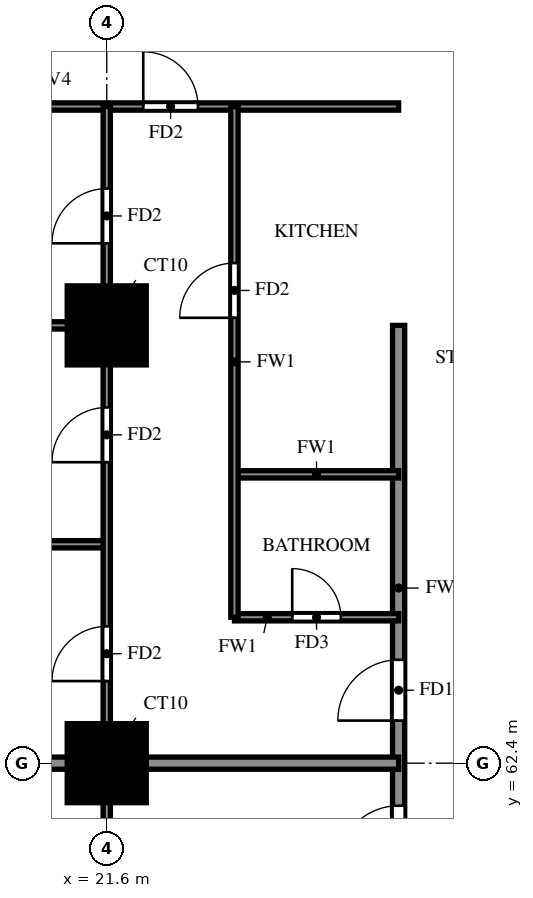
"""IFC4 building model, lengths in metres.
Left out: names, types, materials, properties, quantities, classifications, styles, units other than length and angle.
Written with IfcOpenShell. Run it as: python <this file> out.ifc"""

import sys

from ifc_helpers import new_model, si_unit, direction, frame, frame_2d, origin, origin_2d, place, context, subcontext, project, spatial, rectangle, extrude, source, transform, mapped, element, fill, save


model = new_model("IFC4")
c1 = context("Model", 3, precision=1e-05, world=origin(), true_north=direction((0.0, 1.0)))
c2 = subcontext(c1, "Body", "Model", "MODEL_VIEW")
j1 = project(units=[si_unit("LENGTHUNIT", "METRE"), si_unit("PLANEANGLEUNIT", "RADIAN")], contexts=[c1])
p1 = place(None, origin())
s1 = spatial("IfcSite", under=j1, at=p1, CompositionType="ELEMENT")
p2 = place(p1, origin())
s2 = spatial("IfcBuilding", under=s1, at=p2, CompositionType="ELEMENT")
p3 = place(p2, frame((0.0, 0.0, 62.0)))
s3 = spatial("IfcBuildingStorey", under=s2, at=p3, CompositionType="ELEMENT", Elevation=62.0)
m1 = source(origin(), c2, "Body", "SweptSolid", [
    extrude(rectangle(XDim=1.3, YDim=1.3, at=origin_2d()), origin(), (0.0, 0.0, 1.0), 3.18),
])
for number, where, z_axis, x_axis in (
    (1, (21.6, 62.4, 0.0), (0.0, 0.0, 1.0), (1.0, 0.0, 0.0)),
    (2, (21.6, 69.6, 0.0), (0.0, 0.0, 1.0), (1.0, 0.0, 0.0)),
):
    element("IfcColumn", number, at=place(p3, frame(where, z_axis=z_axis, x_axis=x_axis)), inside=s3, PredefinedType="COLUMN", context=c2, shape_type="MappedRepresentation", body=[
        mapped(m1, transform((0.0, 0.0, 0.0))),
    ])
p4 = place(p3, frame((26.4, 60.0, 0.0), z_axis=(0.0, 0.0, 1.0), x_axis=(0.0, 1.0, 0.0)))
e3 = element("IfcWall", 3, at=p4, inside=s3, PredefinedType="SOLIDWALL", context=c2, shape_type="SweptSolid", body=[
    extrude(rectangle(XDim=9.6, YDim=0.2, at=frame_2d((4.8, 0.0))), origin(), (0.0, 0.0, 1.0), 3.18),
])
p5 = place(p4, frame((0.7, 0.0, 0.0)))
e4 = element("IfcOpeningElement", 4, at=p5, cuts=e3, PredefinedType="OPENING", context=c2, shape_type="SweptSolid", body=[
    extrude(rectangle(XDim=1.0, YDim=2.1, at=frame_2d((0.5, 1.05))), frame((0.0, 0.11, 0.0), z_axis=(0.0, -1.0, 0.0), x_axis=(1.0, 0.0, 0.0)), (0.0, 0.0, 1.0), 0.22),
])
p6 = place(p4, frame((3.1, 0.0, 0.0)))
e5 = element("IfcOpeningElement", 5, at=p6, cuts=e3, PredefinedType="OPENING", context=c2, shape_type="SweptSolid", body=[
    extrude(rectangle(XDim=1.0, YDim=2.1, at=frame_2d((0.5, 1.05))), frame((0.0, 0.11, 0.0), z_axis=(0.0, -1.0, 0.0), x_axis=(1.0, 0.0, 0.0)), (0.0, 0.0, 1.0), 0.22),
])
p7 = place(p3, frame((14.525, 62.4, 0.0), z_axis=(0.0, 0.0, 1.0), x_axis=(1.0, 0.0, 0.0)))
e6 = element("IfcWall", 6, at=p7, inside=s3, PredefinedType="SOLIDWALL", context=c2, shape_type="SweptSolid", body=[
    extrude(rectangle(XDim=11.875, YDim=0.2, at=frame_2d((5.938, 0.0))), origin(), (0.0, 0.0, 1.0), 3.18),
])
p8 = place(p3, frame((23.7, 64.8, 0.0), z_axis=(0.0, 0.0, 1.0), x_axis=(1.0, 0.0, 0.0)))
e7 = element("IfcWall", 7, at=p8, inside=s3, PredefinedType="PARTITIONING", context=c2, shape_type="SweptSolid", body=[
    extrude(rectangle(XDim=2.7, YDim=0.12, at=frame_2d((1.35, 0.0))), origin(), (0.0, 0.0, 1.0), 3.18),
])
p9 = place(p8, frame((0.95, 0.0, 0.0)))
e8 = element("IfcOpeningElement", 8, at=p9, cuts=e7, PredefinedType="OPENING", context=c2, shape_type="SweptSolid", body=[
    extrude(rectangle(XDim=0.8, YDim=2.1, at=frame_2d((0.4, 1.05))), frame((0.0, 0.07, 0.0), z_axis=(0.0, -1.0, 0.0), x_axis=(1.0, 0.0, 0.0)), (0.0, 0.0, 1.0), 0.14),
])
p10 = place(p3, frame((14.525, 66.0, 0.0), z_axis=(0.0, 0.0, 1.0), x_axis=(1.0, 0.0, 0.0)))
e9 = element("IfcWall", 9, at=p10, inside=s3, PredefinedType="PARTITIONING", context=c2, shape_type="SweptSolid", body=[
    extrude(rectangle(XDim=7.075, YDim=0.12, at=frame_2d((3.538, 0.0))), origin(), (0.0, 0.0, 1.0), 2.28),
])
p11 = place(p3, frame((23.7, 67.15, 0.0), z_axis=(0.0, 0.0, 1.0), x_axis=(1.0, 0.0, 0.0)))
e10 = element("IfcWall", 10, at=p11, inside=s3, PredefinedType="PARTITIONING", context=c2, shape_type="SweptSolid", body=[
    extrude(rectangle(XDim=2.7, YDim=0.12, at=frame_2d((1.35, 0.0))), origin(), (0.0, 0.0, 1.0), 3.18),
])
p12 = place(p3, frame((14.525, 69.6, 0.0), z_axis=(0.0, 0.0, 1.0), x_axis=(1.0, 0.0, 0.0)))
e11 = element("IfcWall", 11, at=p12, inside=s3, PredefinedType="PARTITIONING", context=c2, shape_type="SweptSolid", body=[
    extrude(rectangle(XDim=7.075, YDim=0.12, at=frame_2d((3.538, 0.0))), origin(), (0.0, 0.0, 1.0), 3.18),
])
p13 = place(p3, frame((14.525, 73.2, 0.0), z_axis=(0.0, 0.0, 1.0), x_axis=(1.0, 0.0, 0.0)))
e12 = element("IfcWall", 12, at=p13, inside=s3, PredefinedType="PARTITIONING", context=c2, shape_type="SweptSolid", body=[
    extrude(rectangle(XDim=11.875, YDim=0.12, at=frame_2d((5.938, 0.0))), origin(), (0.0, 0.0, 1.0), 2.28),
])
p14 = place(p13, frame((7.675, 0.0, 0.0)))
e13 = element("IfcOpeningElement", 13, at=p14, cuts=e12, PredefinedType="OPENING", context=c2, shape_type="SweptSolid", body=[
    extrude(rectangle(XDim=0.9, YDim=2.1, at=frame_2d((0.45, 1.05))), frame((0.0, 0.07, 0.0), z_axis=(0.0, -1.0, 0.0), x_axis=(1.0, 0.0, 0.0)), (0.0, 0.0, 1.0), 0.14),
])
p15 = place(p3, frame((21.6, 33.725, 0.0), z_axis=(0.0, 0.0, 1.0), x_axis=(0.0, 1.0, 0.0)))
e14 = element("IfcWall", 14, at=p15, inside=s3, PredefinedType="PARTITIONING", context=c2, shape_type="SweptSolid", body=[
    extrude(rectangle(XDim=39.475, YDim=0.12, at=frame_2d((19.737, 0.0))), origin(), (0.0, 0.0, 1.0), 3.18),
])
p16 = place(p15, frame((7.775, 0.0, 0.0)))
e15 = element("IfcOpeningElement", 15, at=p16, cuts=e14, PredefinedType="OPENING", context=c2, shape_type="SweptSolid", body=[
    extrude(rectangle(XDim=0.9, YDim=2.1, at=frame_2d((0.45, 1.05))), frame((0.0, 0.07, 0.0), z_axis=(0.0, -1.0, 0.0), x_axis=(1.0, 0.0, 0.0)), (0.0, 0.0, 1.0), 0.14),
])
p17 = place(p15, frame((15.625, 0.0, 0.0)))
e16 = element("IfcOpeningElement", 16, at=p17, cuts=e14, PredefinedType="OPENING", context=c2, shape_type="SweptSolid", body=[
    extrude(rectangle(XDim=0.9, YDim=2.1, at=frame_2d((0.45, 1.05))), frame((0.0, 0.07, 0.0), z_axis=(0.0, -1.0, 0.0), x_axis=(1.0, 0.0, 0.0)), (0.0, 0.0, 1.0), 0.14),
])
p18 = place(p15, frame((19.225, 0.0, 0.0)))
e17 = element("IfcOpeningElement", 17, at=p18, cuts=e14, PredefinedType="OPENING", context=c2, shape_type="SweptSolid", body=[
    extrude(rectangle(XDim=0.9, YDim=2.1, at=frame_2d((0.45, 1.05))), frame((0.0, 0.07, 0.0), z_axis=(0.0, -1.0, 0.0), x_axis=(1.0, 0.0, 0.0)), (0.0, 0.0, 1.0), 0.14),
])
p19 = place(p15, frame((24.325, 0.0, 0.0)))
e18 = element("IfcOpeningElement", 18, at=p19, cuts=e14, PredefinedType="OPENING", context=c2, shape_type="SweptSolid", body=[
    extrude(rectangle(XDim=1.5, YDim=2.1, at=frame_2d((0.75, 1.05))), frame((0.0, 0.07, 0.0), z_axis=(0.0, -1.0, 0.0), x_axis=(1.0, 0.0, 0.0)), (0.0, 0.0, 1.0), 0.14),
])
p20 = place(p15, frame((30.025, 0.0, 0.0)))
e19 = element("IfcOpeningElement", 19, at=p20, cuts=e14, PredefinedType="OPENING", context=c2, shape_type="SweptSolid", body=[
    extrude(rectangle(XDim=0.9, YDim=2.1, at=frame_2d((0.45, 1.05))), frame((0.0, 0.07, 0.0), z_axis=(0.0, -1.0, 0.0), x_axis=(1.0, 0.0, 0.0)), (0.0, 0.0, 1.0), 0.14),
])
p21 = place(p15, frame((33.625, 0.0, 0.0)))
e20 = element("IfcOpeningElement", 20, at=p21, cuts=e14, PredefinedType="OPENING", context=c2, shape_type="SweptSolid", body=[
    extrude(rectangle(XDim=0.9, YDim=2.1, at=frame_2d((0.45, 1.05))), frame((0.0, 0.07, 0.0), z_axis=(0.0, -1.0, 0.0), x_axis=(1.0, 0.0, 0.0)), (0.0, 0.0, 1.0), 0.14),
])
p22 = place(p15, frame((37.225, 0.0, 0.0)))
e21 = element("IfcOpeningElement", 21, at=p22, cuts=e14, PredefinedType="OPENING", context=c2, shape_type="SweptSolid", body=[
    extrude(rectangle(XDim=0.9, YDim=2.1, at=frame_2d((0.45, 1.05))), frame((0.0, 0.07, 0.0), z_axis=(0.0, -1.0, 0.0), x_axis=(1.0, 0.0, 0.0)), (0.0, 0.0, 1.0), 0.14),
])
p23 = place(p3, frame((23.7, 64.8, 0.0), z_axis=(0.0, 0.0, 1.0), x_axis=(0.0, 1.0, 0.0)))
e22 = element("IfcWall", 22, at=p23, inside=s3, PredefinedType="PARTITIONING", context=c2, shape_type="SweptSolid", body=[
    extrude(rectangle(XDim=8.4, YDim=0.12, at=frame_2d((4.2, 0.0))), origin(), (0.0, 0.0, 1.0), 3.18),
])
p24 = place(p23, frame((4.925, 0.0, 0.0)))
e23 = element("IfcOpeningElement", 23, at=p24, cuts=e22, PredefinedType="OPENING", context=c2, shape_type="SweptSolid", body=[
    extrude(rectangle(XDim=0.9, YDim=2.1, at=frame_2d((0.45, 1.05))), frame((0.0, 0.07, 0.0), z_axis=(0.0, -1.0, 0.0), x_axis=(1.0, 0.0, 0.0)), (0.0, 0.0, 1.0), 0.14),
])
p25 = place(p5, origin())
e24 = element("IfcDoor", 24, at=p25, inside=s3, OperationType="SINGLE_SWING_LEFT", PredefinedType="DOOR", context=c2, shape_type="SweptSolid", body=[
    extrude(rectangle(XDim=1.0, YDim=2.1, at=frame_2d((0.5, 1.05))), frame((0.0, 0.025, 0.0), z_axis=(0.0, -1.0, 0.0), x_axis=(1.0, 0.0, 0.0)), (0.0, 0.0, 1.0), 0.05),
])
fill(e4, e24)
p26 = place(p6, origin())
e25 = element("IfcDoor", 25, at=p26, inside=s3, OperationType="SINGLE_SWING_LEFT", PredefinedType="DOOR", context=c2, shape_type="SweptSolid", body=[
    extrude(rectangle(XDim=1.0, YDim=2.1, at=frame_2d((0.5, 1.05))), frame((0.0, 0.025, 0.0), z_axis=(0.0, -1.0, 0.0), x_axis=(1.0, 0.0, 0.0)), (0.0, 0.0, 1.0), 0.05),
])
fill(e5, e25)
p27 = place(p20, origin())
e26 = element("IfcDoor", 26, at=p27, inside=s3, OperationType="SINGLE_SWING_RIGHT", PredefinedType="DOOR", context=c2, shape_type="SweptSolid", body=[
    extrude(rectangle(XDim=0.9, YDim=2.1, at=frame_2d((0.45, 1.05))), frame((0.0, 0.025, 0.0), z_axis=(0.0, -1.0, 0.0), x_axis=(1.0, 0.0, 0.0)), (0.0, 0.0, 1.0), 0.05),
])
fill(e19, e26)
p28 = place(p21, origin())
e27 = element("IfcDoor", 27, at=p28, inside=s3, OperationType="SINGLE_SWING_LEFT", PredefinedType="DOOR", context=c2, shape_type="SweptSolid", body=[
    extrude(rectangle(XDim=0.9, YDim=2.1, at=frame_2d((0.45, 1.05))), frame((0.0, 0.025, 0.0), z_axis=(0.0, -1.0, 0.0), x_axis=(1.0, 0.0, 0.0)), (0.0, 0.0, 1.0), 0.05),
])
fill(e20, e27)
p29 = place(p22, origin())
e28 = element("IfcDoor", 28, at=p29, inside=s3, OperationType="SINGLE_SWING_LEFT", PredefinedType="DOOR", context=c2, shape_type="SweptSolid", body=[
    extrude(rectangle(XDim=0.9, YDim=2.1, at=frame_2d((0.45, 1.05))), frame((0.0, 0.025, 0.0), z_axis=(0.0, -1.0, 0.0), x_axis=(1.0, 0.0, 0.0)), (0.0, 0.0, 1.0), 0.05),
])
fill(e21, e28)
p30 = place(p14, origin())
e29 = element("IfcDoor", 29, at=p30, inside=s3, OperationType="SINGLE_SWING_RIGHT", PredefinedType="DOOR", context=c2, shape_type="SweptSolid", body=[
    extrude(rectangle(XDim=0.9, YDim=2.1, at=frame_2d((0.45, 1.05))), frame((0.0, 0.025, 0.0), z_axis=(0.0, -1.0, 0.0), x_axis=(1.0, 0.0, 0.0)), (0.0, 0.0, 1.0), 0.05),
])
fill(e13, e29)
p31 = place(p9, origin())
e30 = element("IfcDoor", 30, at=p31, inside=s3, OperationType="SINGLE_SWING_LEFT", PredefinedType="DOOR", context=c2, shape_type="SweptSolid", body=[
    extrude(rectangle(XDim=0.8, YDim=2.1, at=frame_2d((0.4, 1.05))), frame((0.0, 0.025, 0.0), z_axis=(0.0, -1.0, 0.0), x_axis=(1.0, 0.0, 0.0)), (0.0, 0.0, 1.0), 0.05),
])
fill(e8, e30)
p32 = place(p24, origin())
e31 = element("IfcDoor", 31, at=p32, inside=s3, OperationType="SINGLE_SWING_LEFT", PredefinedType="DOOR", context=c2, shape_type="SweptSolid", body=[
    extrude(rectangle(XDim=0.9, YDim=2.1, at=frame_2d((0.45, 1.05))), frame((0.0, 0.025, 0.0), z_axis=(0.0, -1.0, 0.0), x_axis=(1.0, 0.0, 0.0)), (0.0, 0.0, 1.0), 0.05),
])
fill(e23, e31)
save(model, sys.argv[1])
